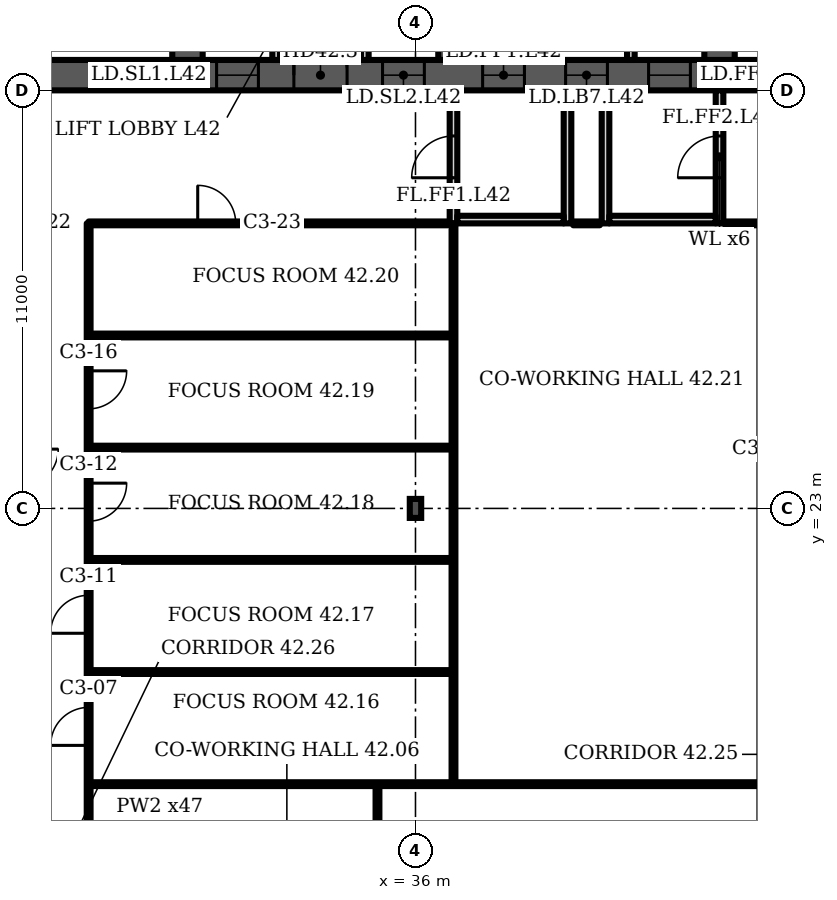
"""IFC4 building model, lengths in metres.
Left out: names, types, materials, properties, quantities, classifications, styles, units other than length and angle.
Written with IfcOpenShell. Run it as: python <this file> out.ifc"""

import sys

from ifc_helpers import new_model, si_unit, direction, frame, frame_2d, origin, origin_2d, place, context, subcontext, project, spatial, polyline, rectangle, i_section, outline, extrude, element, fill, save


model = new_model("IFC4")
c1 = context("Model", 3, precision=1e-05, world=origin(), true_north=direction((0.0, 1.0)))
c2 = subcontext(c1, "Body", "Model", "MODEL_VIEW")
j1 = project(units=[si_unit("LENGTHUNIT", "METRE"), si_unit("PLANEANGLEUNIT", "RADIAN")], contexts=[c1])
p1 = place(None, origin())
s1 = spatial("IfcSite", under=j1, at=p1, CompositionType="ELEMENT")
p2 = place(p1, origin())
s2 = spatial("IfcBuilding", under=s1, at=p2, CompositionType="ELEMENT")
p3 = place(p2, frame((0.0, 0.0, 173.5)))
s3 = spatial("IfcBuildingStorey", under=s2, at=p3, CompositionType="ELEMENT", Elevation=173.5)
p4 = place(p3, frame((16.0, 34.4, 0.0), z_axis=(0.0, 0.0, 1.0), x_axis=(1.0, 0.0, 0.0)))
e1 = element("IfcWall", 1, at=p4, inside=s3, PredefinedType="SHEAR", context=c2, shape_type="SweptSolid", body=[
    extrude(rectangle(XDim=42.0, YDim=0.8, at=frame_2d((21.0, 0.0))), origin(), (0.0, 0.0, 1.0), 3.6),
])
p5 = place(p4, frame((3.2, 0.0, 0.0)))
e2 = element("IfcOpeningElement", 2, at=p5, cuts=e1, PredefinedType="OPENING", context=c2, shape_type="SweptSolid", body=[
    extrude(rectangle(XDim=1.0, YDim=2.1, at=frame_2d((0.5, 1.05))), frame((0.0, 0.41, 0.0), z_axis=(0.0, -1.0, 0.0), x_axis=(1.0, 0.0, 0.0)), (0.0, 0.0, 1.0), 0.82),
])
p6 = place(p4, frame((7.65, 0.0, 0.0)))
e3 = element("IfcOpeningElement", 3, at=p6, cuts=e1, PredefinedType="OPENING", context=c2, shape_type="SweptSolid", body=[
    extrude(rectangle(XDim=1.2, YDim=2.1, at=frame_2d((0.6, 1.05))), frame((0.0, 0.41, 0.0), z_axis=(0.0, -1.0, 0.0), x_axis=(1.0, 0.0, 0.0)), (0.0, 0.0, 1.0), 0.82),
])
p7 = place(p4, frame((14.767, 0.0, 0.0)))
e4 = element("IfcOpeningElement", 4, at=p7, cuts=e1, PredefinedType="OPENING", context=c2, shape_type="SweptSolid", body=[
    extrude(rectangle(XDim=1.1, YDim=2.1, at=frame_2d((0.55, 1.05))), frame((0.0, 0.41, 0.0), z_axis=(0.0, -1.0, 0.0), x_axis=(1.0, 0.0, 0.0)), (0.0, 0.0, 1.0), 0.82),
])
p8 = place(p4, frame((19.133, 0.0, 0.0)))
e5 = element("IfcOpeningElement", 5, at=p8, cuts=e1, PredefinedType="OPENING", context=c2, shape_type="SweptSolid", body=[
    extrude(rectangle(XDim=1.1, YDim=2.1, at=frame_2d((0.55, 1.05))), frame((0.0, 0.41, 0.0), z_axis=(0.0, -1.0, 0.0), x_axis=(1.0, 0.0, 0.0)), (0.0, 0.0, 1.0), 0.82),
])
p9 = place(p4, frame((16.8, 0.0, 0.0)))
e6 = element("IfcOpeningElement", 6, at=p9, cuts=e1, PredefinedType="OPENING", context=c2, shape_type="SweptSolid", body=[
    extrude(rectangle(XDim=1.4, YDim=2.1, at=frame_2d((0.7, 1.05))), frame((0.0, 0.41, 0.0), z_axis=(0.0, -1.0, 0.0), x_axis=(1.0, 0.0, 0.0)), (0.0, 0.0, 1.0), 0.82),
])
p10 = place(p4, frame((21.767, 0.0, 0.0)))
e7 = element("IfcOpeningElement", 7, at=p10, cuts=e1, PredefinedType="OPENING", context=c2, shape_type="SweptSolid", body=[
    extrude(rectangle(XDim=1.1, YDim=2.1, at=frame_2d((0.55, 1.05))), frame((0.0, 0.41, 0.0), z_axis=(0.0, -1.0, 0.0), x_axis=(1.0, 0.0, 0.0)), (0.0, 0.0, 1.0), 0.82),
])
p11 = place(p4, frame((23.95, 0.0, 0.0)))
e8 = element("IfcOpeningElement", 8, at=p11, cuts=e1, PredefinedType="OPENING", context=c2, shape_type="SweptSolid", body=[
    extrude(rectangle(XDim=1.1, YDim=2.1, at=frame_2d((0.55, 1.05))), frame((0.0, 0.41, 0.0), z_axis=(0.0, -1.0, 0.0), x_axis=(1.0, 0.0, 0.0)), (0.0, 0.0, 1.0), 0.82),
])
p12 = place(p4, frame((26.133, 0.0, 0.0)))
e9 = element("IfcOpeningElement", 9, at=p12, cuts=e1, PredefinedType="OPENING", context=c2, shape_type="SweptSolid", body=[
    extrude(rectangle(XDim=1.1, YDim=2.1, at=frame_2d((0.55, 1.05))), frame((0.0, 0.41, 0.0), z_axis=(0.0, -1.0, 0.0), x_axis=(1.0, 0.0, 0.0)), (0.0, 0.0, 1.0), 0.82),
])
p13 = place(p4, frame((33.15, 0.0, 0.0)))
e10 = element("IfcOpeningElement", 10, at=p13, cuts=e1, PredefinedType="OPENING", context=c2, shape_type="SweptSolid", body=[
    extrude(rectangle(XDim=1.2, YDim=2.1, at=frame_2d((0.6, 1.05))), frame((0.0, 0.41, 0.0), z_axis=(0.0, -1.0, 0.0), x_axis=(1.0, 0.0, 0.0)), (0.0, 0.0, 1.0), 0.82),
])
p14 = place(p4, frame((35.817, 0.0, 0.0)))
e11 = element("IfcOpeningElement", 11, at=p14, cuts=e1, PredefinedType="OPENING", context=c2, shape_type="SweptSolid", body=[
    extrude(rectangle(XDim=1.0, YDim=2.1, at=frame_2d((0.5, 1.05))), frame((0.0, 0.41, 0.0), z_axis=(0.0, -1.0, 0.0), x_axis=(1.0, 0.0, 0.0)), (0.0, 0.0, 1.0), 0.82),
])
p15 = place(p4, frame((39.95, 0.0, 0.0)))
e12 = element("IfcOpeningElement", 12, at=p15, cuts=e1, PredefinedType="OPENING", context=c2, shape_type="SweptSolid", body=[
    extrude(rectangle(XDim=1.0, YDim=2.1, at=frame_2d((0.5, 1.05))), frame((0.0, 0.41, 0.0), z_axis=(0.0, -1.0, 0.0), x_axis=(1.0, 0.0, 0.0)), (0.0, 0.0, 1.0), 0.82),
])
p16 = place(p4, frame((37.767, 0.0, 0.0)))
e13 = element("IfcOpeningElement", 13, at=p16, cuts=e1, PredefinedType="OPENING", context=c2, shape_type="SweptSolid", body=[
    extrude(rectangle(XDim=1.4, YDim=2.1, at=frame_2d((0.7, 1.05))), frame((0.0, 0.41, 0.0), z_axis=(0.0, -1.0, 0.0), x_axis=(1.0, 0.0, 0.0)), (0.0, 0.0, 1.0), 0.82),
])
p17 = place(p3, frame((30.0, 34.8, 0.0), z_axis=(0.0, 0.0, 1.0), x_axis=(0.0, 1.0, 0.0)))
e14 = element("IfcWall", 14, at=p17, inside=s3, PredefinedType="SHEAR", context=c2, shape_type="SweptSolid", body=[
    extrude(rectangle(XDim=14.374, YDim=0.8, at=frame_2d((7.187, 0.0))), origin(), (0.0, 0.0, 1.0), 3.6),
])
p18 = place(p17, frame((3.6, 0.0, 0.0)))
e15 = element("IfcOpeningElement", 15, at=p18, cuts=e14, PredefinedType="OPENING", context=c2, shape_type="SweptSolid", body=[
    extrude(rectangle(XDim=1.1, YDim=2.1, at=frame_2d((0.55, 1.05))), frame((0.0, 0.41, 0.0), z_axis=(0.0, -1.0, 0.0), x_axis=(1.0, 0.0, 0.0)), (0.0, 0.0, 1.0), 0.82),
])
p19 = place(p3, frame((37.0, 34.8, 0.0), z_axis=(0.0, 0.0, 1.0), x_axis=(0.0, 1.0, 0.0)))
e16 = element("IfcWall", 16, at=p19, inside=s3, PredefinedType="SHEAR", context=c2, shape_type="SweptSolid", body=[
    extrude(rectangle(XDim=14.987, YDim=0.8, at=frame_2d((7.493, 0.0))), origin(), (0.0, 0.0, 1.0), 3.6),
])
p20 = place(p19, frame((11.312, 0.0, 0.0)))
e17 = element("IfcOpeningElement", 17, at=p20, cuts=e16, PredefinedType="OPENING", context=c2, shape_type="SweptSolid", body=[
    extrude(rectangle(XDim=1.0, YDim=2.1, at=frame_2d((0.5, 1.05))), frame((0.0, 0.41, 0.0), z_axis=(0.0, -1.0, 0.0), x_axis=(1.0, 0.0, 0.0)), (0.0, 0.0, 1.0), 0.82),
])
p21 = place(p19, frame((3.6, 0.0, 0.0)))
e18 = element("IfcOpeningElement", 18, at=p21, cuts=e16, PredefinedType="OPENING", context=c2, shape_type="SweptSolid", body=[
    extrude(rectangle(XDim=1.1, YDim=2.1, at=frame_2d((0.55, 1.05))), frame((0.0, 0.41, 0.0), z_axis=(0.0, -1.0, 0.0), x_axis=(1.0, 0.0, 0.0)), (0.0, 0.0, 1.0), 0.82),
])
p22 = place(p3, frame((44.0, 34.8, 0.0), z_axis=(0.0, 0.0, 1.0), x_axis=(0.0, 1.0, 0.0)))
e19 = element("IfcWall", 19, at=p22, inside=s3, PredefinedType="SHEAR", context=c2, shape_type="SweptSolid", body=[
    extrude(rectangle(XDim=14.374, YDim=0.8, at=frame_2d((7.187, 0.0))), origin(), (0.0, 0.0, 1.0), 3.6),
])
p23 = place(p22, frame((11.312, 0.0, 0.0)))
e20 = element("IfcOpeningElement", 20, at=p23, cuts=e19, PredefinedType="OPENING", context=c2, shape_type="SweptSolid", body=[
    extrude(rectangle(XDim=1.0, YDim=2.1, at=frame_2d((0.5, 1.05))), frame((0.0, 0.41, 0.0), z_axis=(0.0, -1.0, 0.0), x_axis=(1.0, 0.0, 0.0)), (0.0, 0.0, 1.0), 0.82),
])
p24 = place(p22, frame((3.6, 0.0, 0.0)))
e21 = element("IfcOpeningElement", 21, at=p24, cuts=e19, PredefinedType="OPENING", context=c2, shape_type="SweptSolid", body=[
    extrude(rectangle(XDim=1.1, YDim=2.1, at=frame_2d((0.55, 1.05))), frame((0.0, 0.41, 0.0), z_axis=(0.0, -1.0, 0.0), x_axis=(1.0, 0.0, 0.0)), (0.0, 0.0, 1.0), 0.82),
])
p25 = place(p3, frame((36.0, 23.0, 0.0), z_axis=(0.0, 0.0, 1.0), x_axis=(1.0, 0.0, 0.0)))
e22 = element("IfcColumn", 22, at=p25, inside=s3, PredefinedType="COLUMN", context=c2, shape_type="SweptSolid", body=[
    extrude(i_section(OverallWidth=0.3, OverallDepth=0.5, WebThickness=0.014, FlangeThickness=0.028, FilletRadius=0.027, at=origin_2d()), origin(), (0.0, 0.0, 1.0), 3.6),
])
p26 = place(p3, frame((0.0, 0.0, -0.0)))
e23 = element("IfcWall", 23, at=p26, inside=s3, PredefinedType="PARTITIONING", context=c2, shape_type="SweptSolid", body=[
    extrude(outline(polyline([(32.233, 37.65), (30.4, 37.65), (30.4, 37.85), (32.233, 37.85), (32.433, 37.85), (32.433, 34.8), (32.233, 34.8), (32.233, 37.65)])), origin(), (0.0, 0.0, 1.0), 3.2),
])
p27 = place(p3, frame((0.0, 0.0, -0.0)))
e24 = element("IfcWall", 24, at=p27, inside=s3, PredefinedType="PARTITIONING", context=c2, shape_type="SweptSolid", body=[
    extrude(outline(polyline([(34.567, 37.85), (34.767, 37.85), (36.6, 37.85), (36.6, 37.65), (34.767, 37.65), (34.767, 34.8), (34.567, 34.8), (34.567, 37.85)])), origin(), (0.0, 0.0, 1.0), 3.2),
])
p28 = place(p3, frame((0.0, 0.0, -0.0)))
e25 = element("IfcWall", 25, at=p28, inside=s3, PredefinedType="PARTITIONING", context=c2, shape_type="SweptSolid", body=[
    extrude(outline(polyline([(41.567, 37.1), (39.433, 37.1), (39.433, 34.8), (39.233, 34.8), (39.233, 37.65), (37.4, 37.65), (37.4, 37.85), (39.233, 37.85), (39.433, 37.85), (39.433, 37.3), (41.567, 37.3), (41.567, 37.55), (41.767, 37.55), (43.6, 37.55), (43.6, 37.35), (41.767, 37.35), (41.767, 34.8), (41.567, 34.8), (41.567, 37.1)])), origin(), (0.0, 0.0, 1.0), 3.2),
])
p29 = place(p3, frame((37.0, 30.5, 0.0), z_axis=(0.0, 0.0, 1.0), x_axis=(0.0, 1.0, 0.0)))
e26 = element("IfcWall", 26, at=p29, inside=s3, PredefinedType="PARTITIONING", context=c2, shape_type="SweptSolid", body=[
    extrude(rectangle(XDim=3.5, YDim=0.2, at=frame_2d((1.75, 0.0))), origin(), (0.0, 0.0, 1.0), 3.2),
])
p30 = place(p29, frame((1.2, 0.0, 0.0)))
e27 = element("IfcOpeningElement", 27, at=p30, cuts=e26, PredefinedType="OPENING", context=c2, shape_type="SweptSolid", body=[
    extrude(rectangle(XDim=1.1, YDim=2.1, at=frame_2d((0.55, 1.05))), frame((0.0, 0.11, 0.0), z_axis=(0.0, -1.0, 0.0), x_axis=(1.0, 0.0, 0.0)), (0.0, 0.0, 1.0), 0.22),
])
p31 = place(p3, frame((40.0, 30.5, 0.0), z_axis=(0.0, 0.0, 1.0), x_axis=(0.0, 1.0, 0.0)))
e28 = element("IfcWall", 28, at=p31, inside=s3, PredefinedType="PARTITIONING", context=c2, shape_type="SweptSolid", body=[
    extrude(rectangle(XDim=3.5, YDim=0.2, at=frame_2d((1.75, 0.0))), origin(), (0.0, 0.0, 1.0), 3.2),
])
p32 = place(p3, frame((37.1, 30.6, 0.0), z_axis=(0.0, 0.0, 1.0), x_axis=(1.0, 0.0, 0.0)))
e29 = element("IfcWall", 29, at=p32, inside=s3, PredefinedType="PARTITIONING", context=c2, shape_type="SweptSolid", body=[
    extrude(rectangle(XDim=2.8, YDim=0.2, at=frame_2d((1.4, 0.0))), origin(), (0.0, 0.0, 1.0), 3.2),
])
p33 = place(p3, frame((41.0, 30.5, 0.0), z_axis=(0.0, 0.0, 1.0), x_axis=(0.0, 1.0, 0.0)))
e30 = element("IfcWall", 30, at=p33, inside=s3, PredefinedType="PARTITIONING", context=c2, shape_type="SweptSolid", body=[
    extrude(rectangle(XDim=3.5, YDim=0.2, at=frame_2d((1.75, 0.0))), origin(), (0.0, 0.0, 1.0), 3.2),
])
p34 = place(p3, frame((44.0, 30.5, 0.0), z_axis=(0.0, 0.0, 1.0), x_axis=(0.0, 1.0, 0.0)))
e31 = element("IfcWall", 31, at=p34, inside=s3, PredefinedType="PARTITIONING", context=c2, shape_type="SweptSolid", body=[
    extrude(rectangle(XDim=3.5, YDim=0.2, at=frame_2d((1.75, 0.0))), origin(), (0.0, 0.0, 1.0), 3.2),
])
p35 = place(p34, frame((1.2, 0.0, 0.0)))
e32 = element("IfcOpeningElement", 32, at=p35, cuts=e31, PredefinedType="OPENING", context=c2, shape_type="SweptSolid", body=[
    extrude(rectangle(XDim=1.1, YDim=2.1, at=frame_2d((0.55, 1.05))), frame((0.0, 0.11, 0.0), z_axis=(0.0, -1.0, 0.0), x_axis=(1.0, 0.0, 0.0)), (0.0, 0.0, 1.0), 0.22),
])
p36 = place(p3, frame((41.1, 30.6, 0.0), z_axis=(0.0, 0.0, 1.0), x_axis=(1.0, 0.0, 0.0)))
e33 = element("IfcWall", 33, at=p36, inside=s3, PredefinedType="PARTITIONING", context=c2, shape_type="SweptSolid", body=[
    extrude(rectangle(XDim=2.8, YDim=0.2, at=frame_2d((1.4, 0.0))), origin(), (0.0, 0.0, 1.0), 3.2),
])
p37 = place(p3, frame((27.4, 14.24, 0.0), z_axis=(0.0, 0.0, 1.0), x_axis=(0.0, 1.0, 0.0)))
e34 = element("IfcWall", 34, at=p37, inside=s3, PredefinedType="PARTITIONING", context=c2, shape_type="SweptSolid", body=[
    extrude(rectangle(XDim=16.26, YDim=0.1, at=frame_2d((8.13, 0.0))), origin(), (0.0, 0.0, 1.0), 3.2),
])
p38 = place(p37, frame((2.525, 0.0, 0.0)))
e35 = element("IfcOpeningElement", 35, at=p38, cuts=e34, PredefinedType="OPENING", context=c2, shape_type="SweptSolid", body=[
    extrude(rectangle(XDim=1.0, YDim=2.1, at=frame_2d((0.5, 1.05))), frame((0.0, 0.06, 0.0), z_axis=(0.0, -1.0, 0.0), x_axis=(1.0, 0.0, 0.0)), (0.0, 0.0, 1.0), 0.12),
])
p39 = place(p37, frame((5.475, 0.0, 0.0)))
e36 = element("IfcOpeningElement", 36, at=p39, cuts=e34, PredefinedType="OPENING", context=c2, shape_type="SweptSolid", body=[
    extrude(rectangle(XDim=1.0, YDim=2.1, at=frame_2d((0.5, 1.05))), frame((0.0, 0.06, 0.0), z_axis=(0.0, -1.0, 0.0), x_axis=(1.0, 0.0, 0.0)), (0.0, 0.0, 1.0), 0.12),
])
p40 = place(p37, frame((8.425, 0.0, 0.0)))
e37 = element("IfcOpeningElement", 37, at=p40, cuts=e34, PredefinedType="OPENING", context=c2, shape_type="SweptSolid", body=[
    extrude(rectangle(XDim=1.0, YDim=2.1, at=frame_2d((0.5, 1.05))), frame((0.0, 0.06, 0.0), z_axis=(0.0, -1.0, 0.0), x_axis=(1.0, 0.0, 0.0)), (0.0, 0.0, 1.0), 0.12),
])
p41 = place(p37, frame((11.38, 0.0, 0.0)))
e38 = element("IfcOpeningElement", 38, at=p41, cuts=e34, PredefinedType="OPENING", context=c2, shape_type="SweptSolid", body=[
    extrude(rectangle(XDim=1.0, YDim=2.1, at=frame_2d((0.5, 1.05))), frame((0.0, 0.06, 0.0), z_axis=(0.0, -1.0, 0.0), x_axis=(1.0, 0.0, 0.0)), (0.0, 0.0, 1.0), 0.12),
])
p42 = place(p3, frame((27.4, 15.745, 0.0), z_axis=(0.0, 0.0, 1.0), x_axis=(1.0, 0.0, 0.0)))
e39 = element("IfcWall", 39, at=p42, inside=s3, PredefinedType="PARTITIONING", context=c2, shape_type="SweptSolid", body=[
    extrude(rectangle(XDim=17.7, YDim=0.1, at=frame_2d((8.85, 0.0))), origin(), (0.0, 0.0, 1.0), 3.2),
])
for number, where, z_axis, x_axis in (
    (40, (27.4, 18.695, 0.0), (0.0, 0.0, 1.0), (1.0, 0.0, 0.0)),
    (41, (27.4, 21.645, 0.0), (0.0, 0.0, 1.0), (1.0, 0.0, 0.0)),
    (42, (27.4, 24.6, 0.0), (0.0, 0.0, 1.0), (1.0, 0.0, 0.0)),
    (43, (27.4, 27.55, 0.0), (0.0, 0.0, 1.0), (1.0, 0.0, 0.0)),
):
    element("IfcWall", number, at=place(p3, frame(where, z_axis=z_axis, x_axis=x_axis)), inside=s3, PredefinedType="PARTITIONING", context=c2, shape_type="SweptSolid", body=[
        extrude(rectangle(XDim=9.6, YDim=0.1, at=frame_2d((4.8, 0.0))), origin(), (0.0, 0.0, 1.0), 3.2),
    ])
p43 = place(p3, frame((27.4, 30.5, 0.0), z_axis=(0.0, 0.0, 1.0), x_axis=(1.0, 0.0, 0.0)))
e44 = element("IfcWall", 44, at=p43, inside=s3, PredefinedType="PARTITIONING", context=c2, shape_type="SweptSolid", body=[
    extrude(rectangle(XDim=9.45, YDim=0.1, at=frame_2d((4.725, 0.0))), origin(), (0.0, 0.0, 1.0), 3.2),
])
p44 = place(p43, frame((2.87, 0.0, 0.0)))
e45 = element("IfcOpeningElement", 45, at=p44, cuts=e44, PredefinedType="OPENING", context=c2, shape_type="SweptSolid", body=[
    extrude(rectangle(XDim=1.0, YDim=2.1, at=frame_2d((0.5, 1.05))), frame((0.0, 0.06, 0.0), z_axis=(0.0, -1.0, 0.0), x_axis=(1.0, 0.0, 0.0)), (0.0, 0.0, 1.0), 0.12),
])
p45 = place(p3, frame((35.0, 2.37, 0.0), z_axis=(0.0, 0.0, 1.0), x_axis=(0.0, 1.0, 0.0)))
e46 = element("IfcWall", 46, at=p45, inside=s3, PredefinedType="PARTITIONING", context=c2, shape_type="SweptSolid", body=[
    extrude(rectangle(XDim=13.375, YDim=0.1, at=frame_2d((6.688, 0.0))), origin(), (0.0, 0.0, 1.0), 3.2),
])
p46 = place(p3, frame((37.0, 15.745, 0.0), z_axis=(0.0, 0.0, 1.0), x_axis=(0.0, 1.0, 0.0)))
e47 = element("IfcWall", 47, at=p46, inside=s3, PredefinedType="PARTITIONING", context=c2, shape_type="SweptSolid", body=[
    extrude(rectangle(XDim=14.755, YDim=0.1, at=frame_2d((7.377, 0.0))), origin(), (0.0, 0.0, 1.0), 3.2),
])
p47 = place(p3, frame((40.15, 30.5, 0.0), z_axis=(0.0, 0.0, 1.0), x_axis=(1.0, 0.0, 0.0)))
e48 = element("IfcWall", 48, at=p47, inside=s3, PredefinedType="PARTITIONING", context=c2, shape_type="SweptSolid", body=[
    extrude(rectangle(XDim=0.7, YDim=0.1, at=frame_2d((0.35, 0.0))), origin(), (0.0, 0.0, 1.0), 3.2),
])
p48 = place(p3, frame((44.15, 30.5, 0.0), z_axis=(0.0, 0.0, 1.0), x_axis=(1.0, 0.0, 0.0)))
e49 = element("IfcWall", 49, at=p48, inside=s3, PredefinedType="PARTITIONING", context=c2, shape_type="SweptSolid", body=[
    extrude(rectangle(XDim=0.95, YDim=0.1, at=frame_2d((0.475, 0.0))), origin(), (0.0, 0.0, 1.0), 3.2),
])
p49 = place(p7, origin())
e50 = element("IfcDoor", 50, at=p49, inside=s3, OperationType="DOUBLE_DOOR_SLIDING", PredefinedType="DOOR", context=c2, shape_type="SweptSolid", body=[
    extrude(rectangle(XDim=1.1, YDim=2.1, at=frame_2d((0.55, 1.05))), frame((0.0, 0.025, 0.0), z_axis=(0.0, -1.0, 0.0), x_axis=(1.0, 0.0, 0.0)), (0.0, 0.0, 1.0), 0.05),
])
fill(e4, e50)
p50 = place(p8, origin())
e51 = element("IfcDoor", 51, at=p50, inside=s3, OperationType="DOUBLE_DOOR_SLIDING", PredefinedType="DOOR", context=c2, shape_type="SweptSolid", body=[
    extrude(rectangle(XDim=1.1, YDim=2.1, at=frame_2d((0.55, 1.05))), frame((0.0, 0.025, 0.0), z_axis=(0.0, -1.0, 0.0), x_axis=(1.0, 0.0, 0.0)), (0.0, 0.0, 1.0), 0.05),
])
fill(e5, e51)
p51 = place(p9, origin())
e52 = element("IfcDoor", 52, at=p51, inside=s3, OperationType="DOUBLE_DOOR_SINGLE_SWING", PredefinedType="DOOR", context=c2, shape_type="SweptSolid", body=[
    extrude(rectangle(XDim=1.4, YDim=2.1, at=frame_2d((0.7, 1.05))), frame((0.0, 0.025, 0.0), z_axis=(0.0, -1.0, 0.0), x_axis=(1.0, 0.0, 0.0)), (0.0, 0.0, 1.0), 0.05),
])
fill(e6, e52)
p52 = place(p10, origin())
e53 = element("IfcDoor", 53, at=p52, inside=s3, OperationType="DOUBLE_DOOR_SLIDING", PredefinedType="DOOR", context=c2, shape_type="SweptSolid", body=[
    extrude(rectangle(XDim=1.1, YDim=2.1, at=frame_2d((0.55, 1.05))), frame((0.0, 0.025, 0.0), z_axis=(0.0, -1.0, 0.0), x_axis=(1.0, 0.0, 0.0)), (0.0, 0.0, 1.0), 0.05),
])
fill(e7, e53)
p53 = place(p11, origin())
e54 = element("IfcDoor", 54, at=p53, inside=s3, OperationType="DOUBLE_DOOR_SLIDING", PredefinedType="DOOR", context=c2, shape_type="SweptSolid", body=[
    extrude(rectangle(XDim=1.1, YDim=2.1, at=frame_2d((0.55, 1.05))), frame((0.0, 0.025, 0.0), z_axis=(0.0, -1.0, 0.0), x_axis=(1.0, 0.0, 0.0)), (0.0, 0.0, 1.0), 0.05),
])
fill(e8, e54)
p54 = place(p12, origin())
e55 = element("IfcDoor", 55, at=p54, inside=s3, OperationType="DOUBLE_DOOR_SLIDING", PredefinedType="DOOR", context=c2, shape_type="SweptSolid", body=[
    extrude(rectangle(XDim=1.1, YDim=2.1, at=frame_2d((0.55, 1.05))), frame((0.0, 0.025, 0.0), z_axis=(0.0, -1.0, 0.0), x_axis=(1.0, 0.0, 0.0)), (0.0, 0.0, 1.0), 0.05),
])
fill(e9, e55)
p55 = place(p30, origin())
e56 = element("IfcDoor", 56, at=p55, inside=s3, OperationType="SINGLE_SWING_LEFT", PredefinedType="DOOR", context=c2, shape_type="SweptSolid", body=[
    extrude(rectangle(XDim=1.1, YDim=2.1, at=frame_2d((0.55, 1.05))), frame((0.0, 0.025, 0.0), z_axis=(0.0, -1.0, 0.0), x_axis=(1.0, 0.0, 0.0)), (0.0, 0.0, 1.0), 0.05),
])
fill(e27, e56)
p56 = place(p35, origin())
e57 = element("IfcDoor", 57, at=p56, inside=s3, OperationType="SINGLE_SWING_LEFT", PredefinedType="DOOR", context=c2, shape_type="SweptSolid", body=[
    extrude(rectangle(XDim=1.1, YDim=2.1, at=frame_2d((0.55, 1.05))), frame((0.0, 0.025, 0.0), z_axis=(0.0, -1.0, 0.0), x_axis=(1.0, 0.0, 0.0)), (0.0, 0.0, 1.0), 0.05),
])
fill(e32, e57)
p57 = place(p38, origin())
e58 = element("IfcDoor", 58, at=p57, inside=s3, OperationType="SINGLE_SWING_LEFT", PredefinedType="DOOR", context=c2, shape_type="SweptSolid", body=[
    extrude(rectangle(XDim=1.0, YDim=2.1, at=frame_2d((0.5, 1.05))), frame((0.0, 0.025, 0.0), z_axis=(0.0, -1.0, 0.0), x_axis=(1.0, 0.0, 0.0)), (0.0, 0.0, 1.0), 0.05),
])
fill(e35, e58)
p58 = place(p39, origin())
e59 = element("IfcDoor", 59, at=p58, inside=s3, OperationType="SINGLE_SWING_LEFT", PredefinedType="DOOR", context=c2, shape_type="SweptSolid", body=[
    extrude(rectangle(XDim=1.0, YDim=2.1, at=frame_2d((0.5, 1.05))), frame((0.0, 0.025, 0.0), z_axis=(0.0, -1.0, 0.0), x_axis=(1.0, 0.0, 0.0)), (0.0, 0.0, 1.0), 0.05),
])
fill(e36, e59)
p59 = place(p40, origin())
e60 = element("IfcDoor", 60, at=p59, inside=s3, OperationType="SINGLE_SWING_RIGHT", PredefinedType="DOOR", context=c2, shape_type="SweptSolid", body=[
    extrude(rectangle(XDim=1.0, YDim=2.1, at=frame_2d((0.5, 1.05))), frame((0.0, 0.025, 0.0), z_axis=(0.0, -1.0, 0.0), x_axis=(1.0, 0.0, 0.0)), (0.0, 0.0, 1.0), 0.05),
])
fill(e37, e60)
p60 = place(p41, origin())
e61 = element("IfcDoor", 61, at=p60, inside=s3, OperationType="SINGLE_SWING_RIGHT", PredefinedType="DOOR", context=c2, shape_type="SweptSolid", body=[
    extrude(rectangle(XDim=1.0, YDim=2.1, at=frame_2d((0.5, 1.05))), frame((0.0, 0.025, 0.0), z_axis=(0.0, -1.0, 0.0), x_axis=(1.0, 0.0, 0.0)), (0.0, 0.0, 1.0), 0.05),
])
fill(e38, e61)
p61 = place(p44, origin())
e62 = element("IfcDoor", 62, at=p61, inside=s3, OperationType="SINGLE_SWING_LEFT", PredefinedType="DOOR", context=c2, shape_type="SweptSolid", body=[
    extrude(rectangle(XDim=1.0, YDim=2.1, at=frame_2d((0.5, 1.05))), frame((0.0, 0.025, 0.0), z_axis=(0.0, -1.0, 0.0), x_axis=(1.0, 0.0, 0.0)), (0.0, 0.0, 1.0), 0.05),
])
fill(e45, e62)
save(model, sys.argv[1])
